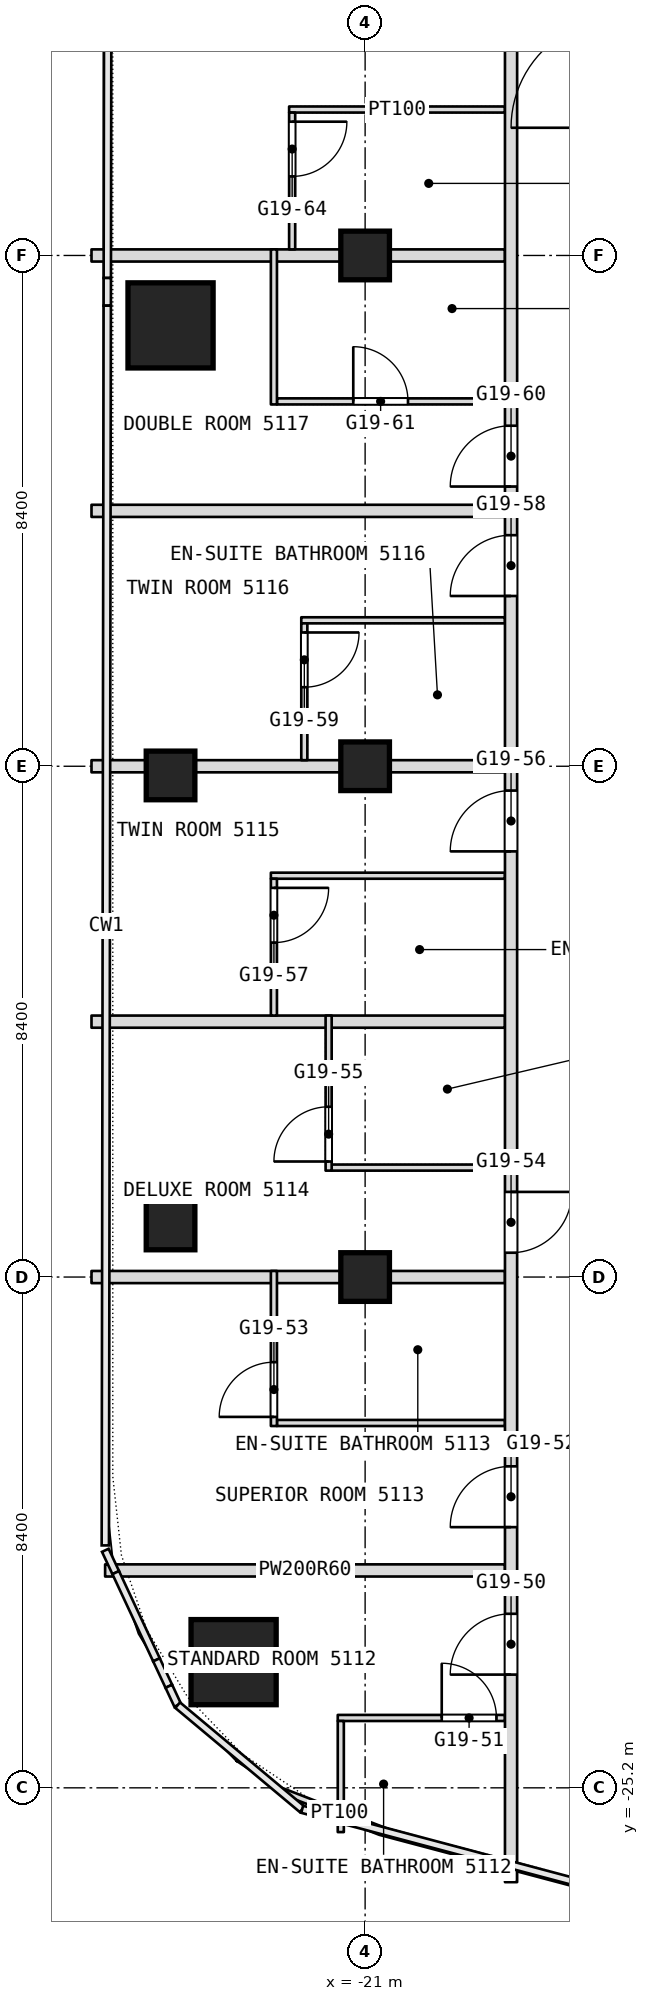
"""IFC4 building model, lengths in metres.
Left out: names, types, materials, properties, quantities, classifications, styles, units other than length and angle.
Written with IfcOpenShell. Run it as: python <this file> out.ifc"""

import sys

from ifc_helpers import new_model, si_unit, direction, frame, frame_2d, origin, origin_2d, place, context, subcontext, project, spatial, rectangle, extrude, element, fill, save


model = new_model("IFC4")
c1 = context("Model", 3, precision=1e-05, world=origin(), true_north=direction((0.0, 1.0)))
c2 = subcontext(c1, "Body", "Model", "MODEL_VIEW")
j1 = project(units=[si_unit("LENGTHUNIT", "METRE"), si_unit("PLANEANGLEUNIT", "RADIAN")], contexts=[c1])
p1 = place(None, origin())
s1 = spatial("IfcSite", under=j1, at=p1, CompositionType="ELEMENT")
p2 = place(p1, origin())
s2 = spatial("IfcBuilding", under=s1, at=p2, CompositionType="ELEMENT")
p3 = place(p2, frame((0.0, 0.0, 220.1)))
s3 = spatial("IfcBuildingStorey", under=s2, at=p3, CompositionType="ELEMENT", Elevation=220.1)
for number, where, z_axis, x_axis in (
    (1, (-23.163, -23.133, 0.0), (0.0, 0.0, 1.0), (1.0, 0.0, 0.0)),
    (2, (-24.2, -1.15, 0.0), (0.0, 0.0, 1.0), (1.0, 0.0, 0.0)),
):
    element("IfcColumn", number, at=place(p3, frame(where, z_axis=z_axis, x_axis=x_axis)), inside=s3, PredefinedType="COLUMN", context=c2, shape_type="SweptSolid", body=[
        extrude(rectangle(XDim=1.4, YDim=1.4, at=origin_2d()), origin(), (0.0, 0.0, 1.0), 3.6),
    ])
for number, where, z_axis, x_axis in (
    (3, (-21.0, -16.8, 0.0), (0.0, 0.0, 1.0), (1.0, 0.0, 0.0)),
    (4, (-21.0, -8.4, 0.0), (0.0, 0.0, 1.0), (1.0, 0.0, 0.0)),
    (5, (-21.0, 0.0, 0.0), (0.0, 0.0, 1.0), (1.0, 0.0, 0.0)),
    (6, (-24.2, -15.952, 0.0), (0.0, 0.0, 1.0), (1.0, 0.0, 0.0)),
    (7, (-24.2, -8.551, 0.0), (0.0, 0.0, 1.0), (1.0, 0.0, 0.0)),
):
    element("IfcColumn", number, at=place(p3, frame(where, z_axis=z_axis, x_axis=x_axis)), inside=s3, PredefinedType="COLUMN", context=c2, shape_type="SweptSolid", body=[
        extrude(rectangle(XDim=0.8, YDim=0.8, at=origin_2d()), origin(), (0.0, 0.0, 1.0), 3.6),
    ])
p4 = place(p3, frame((-22.386, -25.247, 0.0), z_axis=(0.0, 0.0, 1.0), x_axis=(0.932741240306, -0.360546499959, 0.0)))
e8 = element("IfcWall", 8, at=p4, inside=s3, PredefinedType="PARTITIONING", context=c2, shape_type="SweptSolid", body=[
    extrude(rectangle(XDim=2.066, YDim=0.1, at=frame_2d((1.033, 0.0))), origin(), (0.0, 0.0, 1.0), 3.34),
])
p5 = place(p3, frame((-21.45, -24.051, 0.0), z_axis=(0.0, 0.0, 1.0), x_axis=(1.0, 0.0, 0.0)))
e9 = element("IfcWall", 9, at=p5, inside=s3, PredefinedType="PARTITIONING", context=c2, shape_type="SweptSolid", body=[
    extrude(rectangle(XDim=2.75, YDim=0.1, at=frame_2d((1.375, 0.0))), origin(), (0.0, 0.0, 1.0), 3.34),
])
p6 = place(p5, frame((1.71, 0.0, 0.0)))
e10 = element("IfcOpeningElement", 10, at=p6, cuts=e9, PredefinedType="OPENING", context=c2, shape_type="SweptSolid", body=[
    extrude(rectangle(XDim=0.9, YDim=2.1, at=frame_2d((0.45, 1.05))), frame((0.0, 0.05, 0.0), z_axis=(0.0, -1.0, 0.0), x_axis=(1.0, 0.0, 0.0)), (0.0, 0.0, 1.0), 0.1),
])
p7 = place(p3, frame((-25.276, -21.625, 0.0), z_axis=(0.0, 0.0, 1.0), x_axis=(1.0, 0.0, 0.0)))
e11 = element("IfcWall", 11, at=p7, inside=s3, PredefinedType="PARTITIONING", context=c2, shape_type="SweptSolid", body=[
    extrude(rectangle(XDim=6.576, YDim=0.2, at=frame_2d((3.288, 0.0))), origin(), (0.0, 0.0, 1.0), 3.34),
])
p8 = place(p3, frame((-22.45, -19.2, 0.0), z_axis=(0.0, 0.0, 1.0), x_axis=(1.0, 0.0, 0.0)))
e12 = element("IfcWall", 12, at=p8, inside=s3, PredefinedType="PARTITIONING", context=c2, shape_type="SweptSolid", body=[
    extrude(rectangle(XDim=3.75, YDim=0.1, at=frame_2d((1.875, 0.0))), origin(), (0.0, 0.0, 1.0), 3.34),
])
p9 = place(p3, frame((-25.5, -16.8, 0.0), z_axis=(0.0, 0.0, 1.0), x_axis=(1.0, 0.0, 0.0)))
e13 = element("IfcWall", 13, at=p9, inside=s3, PredefinedType="PARTITIONING", context=c2, shape_type="SweptSolid", body=[
    extrude(rectangle(XDim=6.8, YDim=0.2, at=frame_2d((3.4, 0.0))), origin(), (0.0, 0.0, 1.0), 2.94),
])
p10 = place(p3, frame((-21.55, -15.0, 0.0), z_axis=(0.0, 0.0, 1.0), x_axis=(1.0, 0.0, 0.0)))
e14 = element("IfcWall", 14, at=p10, inside=s3, PredefinedType="PARTITIONING", context=c2, shape_type="SweptSolid", body=[
    extrude(rectangle(XDim=2.85, YDim=0.1, at=frame_2d((1.425, 0.0))), origin(), (0.0, 0.0, 1.0), 3.34),
])
p11 = place(p3, frame((-25.5, -12.6, 0.0), z_axis=(0.0, 0.0, 1.0), x_axis=(1.0, 0.0, 0.0)))
e15 = element("IfcWall", 15, at=p11, inside=s3, PredefinedType="PARTITIONING", context=c2, shape_type="SweptSolid", body=[
    extrude(rectangle(XDim=6.8, YDim=0.2, at=frame_2d((3.4, 0.0))), origin(), (0.0, 0.0, 1.0), 3.34),
])
p12 = place(p3, frame((-22.55, -10.2, 0.0), z_axis=(0.0, 0.0, 1.0), x_axis=(1.0, 0.0, 0.0)))
e16 = element("IfcWall", 16, at=p12, inside=s3, PredefinedType="PARTITIONING", context=c2, shape_type="SweptSolid", body=[
    extrude(rectangle(XDim=3.85, YDim=0.1, at=frame_2d((1.925, 0.0))), origin(), (0.0, 0.0, 1.0), 3.34),
])
p13 = place(p3, frame((-25.5, -8.4, 0.0), z_axis=(0.0, 0.0, 1.0), x_axis=(1.0, 0.0, 0.0)))
e17 = element("IfcWall", 17, at=p13, inside=s3, PredefinedType="PARTITIONING", context=c2, shape_type="SweptSolid", body=[
    extrude(rectangle(XDim=6.8, YDim=0.2, at=frame_2d((3.4, 0.0))), origin(), (0.0, 0.0, 1.0), 2.94),
])
p14 = place(p3, frame((-22.05, -6.0, 0.0), z_axis=(0.0, 0.0, 1.0), x_axis=(1.0, 0.0, 0.0)))
e18 = element("IfcWall", 18, at=p14, inside=s3, PredefinedType="PARTITIONING", context=c2, shape_type="SweptSolid", body=[
    extrude(rectangle(XDim=3.35, YDim=0.1, at=frame_2d((1.675, 0.0))), origin(), (0.0, 0.0, 1.0), 3.34),
])
p15 = place(p3, frame((-25.5, -4.2, 0.0), z_axis=(0.0, 0.0, 1.0), x_axis=(1.0, 0.0, 0.0)))
e19 = element("IfcWall", 19, at=p15, inside=s3, PredefinedType="PARTITIONING", context=c2, shape_type="SweptSolid", body=[
    extrude(rectangle(XDim=6.8, YDim=0.2, at=frame_2d((3.4, 0.0))), origin(), (0.0, 0.0, 1.0), 3.34),
])
p16 = place(p3, frame((-22.45, -2.4, 0.0), z_axis=(0.0, 0.0, 1.0), x_axis=(1.0, 0.0, 0.0)))
e20 = element("IfcWall", 20, at=p16, inside=s3, PredefinedType="PARTITIONING", context=c2, shape_type="SweptSolid", body=[
    extrude(rectangle(XDim=3.75, YDim=0.1, at=frame_2d((1.875, 0.0))), origin(), (0.0, 0.0, 1.0), 3.34),
])
p17 = place(p16, frame((1.255, 0.0, 0.0)))
e21 = element("IfcOpeningElement", 21, at=p17, cuts=e20, PredefinedType="OPENING", context=c2, shape_type="SweptSolid", body=[
    extrude(rectangle(XDim=0.9, YDim=2.1, at=frame_2d((0.45, 1.05))), frame((0.0, 0.05, 0.0), z_axis=(0.0, -1.0, 0.0), x_axis=(1.0, 0.0, 0.0)), (0.0, 0.0, 1.0), 0.1),
])
p18 = place(p3, frame((-25.5, 0.0, 0.0), z_axis=(0.0, 0.0, 1.0), x_axis=(1.0, 0.0, 0.0)))
e22 = element("IfcWall", 22, at=p18, inside=s3, PredefinedType="PARTITIONING", context=c2, shape_type="SweptSolid", body=[
    extrude(rectangle(XDim=6.8, YDim=0.2, at=frame_2d((3.4, 0.0))), origin(), (0.0, 0.0, 1.0), 2.94),
])
p19 = place(p3, frame((-22.25, 2.4, 0.0), z_axis=(0.0, 0.0, 1.0), x_axis=(1.0, 0.0, 0.0)))
e23 = element("IfcWall", 23, at=p19, inside=s3, PredefinedType="PARTITIONING", context=c2, shape_type="SweptSolid", body=[
    extrude(rectangle(XDim=3.55, YDim=0.1, at=frame_2d((1.775, 0.0))), origin(), (0.0, 0.0, 1.0), 3.34),
])
p20 = place(p3, frame((-18.6, -26.751, 0.0), z_axis=(0.0, 0.0, 1.0), x_axis=(0.0, 1.0, 0.0)))
e24 = element("IfcWall", 24, at=p20, inside=s3, PredefinedType="PARTITIONING", context=c2, shape_type="SweptSolid", body=[
    extrude(rectangle(XDim=49.091, YDim=0.2, at=frame_2d((24.545, 0.0))), origin(), (0.0, 0.0, 1.0), 3.34),
])
p21 = place(p20, frame((3.413, 0.0, 0.0)))
e25 = element("IfcOpeningElement", 25, at=p21, cuts=e24, PredefinedType="OPENING", context=c2, shape_type="SweptSolid", body=[
    extrude(rectangle(XDim=1.0, YDim=2.1, at=frame_2d((0.5, 1.05))), frame((0.0, 0.1, 0.0), z_axis=(0.0, -1.0, 0.0), x_axis=(1.0, 0.0, 0.0)), (0.0, 0.0, 1.0), 0.2),
])
p22 = place(p20, frame((5.838, 0.0, 0.0)))
e26 = element("IfcOpeningElement", 26, at=p22, cuts=e24, PredefinedType="OPENING", context=c2, shape_type="SweptSolid", body=[
    extrude(rectangle(XDim=1.0, YDim=2.1, at=frame_2d((0.5, 1.05))), frame((0.0, 0.1, 0.0), z_axis=(0.0, -1.0, 0.0), x_axis=(1.0, 0.0, 0.0)), (0.0, 0.0, 1.0), 0.2),
])
p23 = place(p20, frame((10.351, 0.0, 0.0)))
e27 = element("IfcOpeningElement", 27, at=p23, cuts=e24, PredefinedType="OPENING", context=c2, shape_type="SweptSolid", body=[
    extrude(rectangle(XDim=1.0, YDim=2.1, at=frame_2d((0.5, 1.05))), frame((0.0, 0.1, 0.0), z_axis=(0.0, -1.0, 0.0), x_axis=(1.0, 0.0, 0.0)), (0.0, 0.0, 1.0), 0.2),
])
p24 = place(p20, frame((16.951, 0.0, 0.0)))
e28 = element("IfcOpeningElement", 28, at=p24, cuts=e24, PredefinedType="OPENING", context=c2, shape_type="SweptSolid", body=[
    extrude(rectangle(XDim=1.0, YDim=2.1, at=frame_2d((0.5, 1.05))), frame((0.0, 0.1, 0.0), z_axis=(0.0, -1.0, 0.0), x_axis=(1.0, 0.0, 0.0)), (0.0, 0.0, 1.0), 0.2),
])
p25 = place(p20, frame((21.151, 0.0, 0.0)))
e29 = element("IfcOpeningElement", 29, at=p25, cuts=e24, PredefinedType="OPENING", context=c2, shape_type="SweptSolid", body=[
    extrude(rectangle(XDim=1.0, YDim=2.1, at=frame_2d((0.5, 1.05))), frame((0.0, 0.1, 0.0), z_axis=(0.0, -1.0, 0.0), x_axis=(1.0, 0.0, 0.0)), (0.0, 0.0, 1.0), 0.2),
])
p26 = place(p20, frame((22.951, 0.0, 0.0)))
e30 = element("IfcOpeningElement", 30, at=p26, cuts=e24, PredefinedType="OPENING", context=c2, shape_type="SweptSolid", body=[
    extrude(rectangle(XDim=1.0, YDim=2.1, at=frame_2d((0.5, 1.05))), frame((0.0, 0.1, 0.0), z_axis=(0.0, -1.0, 0.0), x_axis=(1.0, 0.0, 0.0)), (0.0, 0.0, 1.0), 0.2),
])
p27 = place(p20, frame((30.351, 0.0, 0.0)))
e31 = element("IfcOpeningElement", 31, at=p27, cuts=e24, PredefinedType="OPENING", context=c2, shape_type="SweptSolid", body=[
    extrude(rectangle(XDim=1.1, YDim=2.1, at=frame_2d((0.55, 1.05))), frame((0.0, 0.1, 0.0), z_axis=(0.0, -1.0, 0.0), x_axis=(1.0, 0.0, 0.0)), (0.0, 0.0, 1.0), 0.2),
])
p28 = place(p20, frame((37.951, 0.0, 0.0)))
e32 = element("IfcOpeningElement", 32, at=p28, cuts=e24, PredefinedType="OPENING", context=c2, shape_type="SweptSolid", body=[
    extrude(rectangle(XDim=1.0, YDim=2.1, at=frame_2d((0.5, 1.05))), frame((0.0, 0.1, 0.0), z_axis=(0.0, -1.0, 0.0), x_axis=(1.0, 0.0, 0.0)), (0.0, 0.0, 1.0), 0.2),
])
p29 = place(p20, frame((39.751, 0.0, 0.0)))
e33 = element("IfcOpeningElement", 33, at=p29, cuts=e24, PredefinedType="OPENING", context=c2, shape_type="SweptSolid", body=[
    extrude(rectangle(XDim=1.0, YDim=2.1, at=frame_2d((0.5, 1.05))), frame((0.0, 0.1, 0.0), z_axis=(0.0, -1.0, 0.0), x_axis=(1.0, 0.0, 0.0)), (0.0, 0.0, 1.0), 0.2),
])
p30 = place(p20, frame((44.051, 0.0, 0.0)))
e34 = element("IfcOpeningElement", 34, at=p30, cuts=e24, PredefinedType="OPENING", context=c2, shape_type="SweptSolid", body=[
    extrude(rectangle(XDim=1.0, YDim=2.1, at=frame_2d((0.5, 1.05))), frame((0.0, 0.1, 0.0), z_axis=(0.0, -1.0, 0.0), x_axis=(1.0, 0.0, 0.0)), (0.0, 0.0, 1.0), 0.2),
])
p31 = place(p3, frame((-21.4, -25.928, 0.0), z_axis=(0.0, 0.0, 1.0), x_axis=(0.0, 1.0, 0.0)))
e35 = element("IfcWall", 35, at=p31, inside=s3, PredefinedType="PARTITIONING", context=c2, shape_type="SweptSolid", body=[
    extrude(rectangle(XDim=1.827, YDim=0.1, at=frame_2d((0.914, 0.0))), origin(), (0.0, 0.0, 1.0), 3.34),
])
p32 = place(p3, frame((-21.6, -15.05, 0.0), z_axis=(0.0, 0.0, 1.0), x_axis=(0.0, 1.0, 0.0)))
e36 = element("IfcWall", 36, at=p32, inside=s3, PredefinedType="PARTITIONING", context=c2, shape_type="SweptSolid", body=[
    extrude(rectangle(XDim=2.55, YDim=0.1, at=frame_2d((1.275, 0.0))), origin(), (0.0, 0.0, 1.0), 3.34),
])
p33 = place(p32, frame((0.15, 0.0, 0.0)))
e37 = element("IfcOpeningElement", 37, at=p33, cuts=e36, PredefinedType="OPENING", context=c2, shape_type="SweptSolid", body=[
    extrude(rectangle(XDim=0.9, YDim=2.1, at=frame_2d((0.45, 1.05))), frame((0.0, 0.05, 0.0), z_axis=(0.0, -1.0, 0.0), x_axis=(1.0, 0.0, 0.0)), (0.0, 0.0, 1.0), 0.1),
])
p34 = place(p3, frame((-22.0, -8.3, 0.0), z_axis=(0.0, 0.0, 1.0), x_axis=(0.0, 1.0, 0.0)))
e38 = element("IfcWall", 38, at=p34, inside=s3, PredefinedType="PARTITIONING", context=c2, shape_type="SweptSolid", body=[
    extrude(rectangle(XDim=2.25, YDim=0.1, at=frame_2d((1.125, 0.0))), origin(), (0.0, 0.0, 1.0), 3.34),
])
p35 = place(p34, frame((1.2, 0.0, 0.0)))
e39 = element("IfcOpeningElement", 39, at=p35, cuts=e38, PredefinedType="OPENING", context=c2, shape_type="SweptSolid", body=[
    extrude(rectangle(XDim=0.9, YDim=2.1, at=frame_2d((0.45, 1.05))), frame((0.0, 0.05, 0.0), z_axis=(0.0, -1.0, 0.0), x_axis=(1.0, 0.0, 0.0)), (0.0, 0.0, 1.0), 0.1),
])
p36 = place(p3, frame((-22.2, 0.1, 0.0), z_axis=(0.0, 0.0, 1.0), x_axis=(0.0, 1.0, 0.0)))
e40 = element("IfcWall", 40, at=p36, inside=s3, PredefinedType="PARTITIONING", context=c2, shape_type="SweptSolid", body=[
    extrude(rectangle(XDim=2.25, YDim=0.1, at=frame_2d((1.125, 0.0))), origin(), (0.0, 0.0, 1.0), 3.34),
])
p37 = place(p36, frame((1.2, 0.0, 0.0)))
e41 = element("IfcOpeningElement", 41, at=p37, cuts=e40, PredefinedType="OPENING", context=c2, shape_type="SweptSolid", body=[
    extrude(rectangle(XDim=0.9, YDim=2.1, at=frame_2d((0.45, 1.05))), frame((0.0, 0.05, 0.0), z_axis=(0.0, -1.0, 0.0), x_axis=(1.0, 0.0, 0.0)), (0.0, 0.0, 1.0), 0.1),
])
p38 = place(p3, frame((-22.5, -19.25, 0.0), z_axis=(0.0, 0.0, 1.0), x_axis=(0.0, 1.0, 0.0)))
e42 = element("IfcWall", 42, at=p38, inside=s3, PredefinedType="PARTITIONING", context=c2, shape_type="SweptSolid", body=[
    extrude(rectangle(XDim=2.55, YDim=0.1, at=frame_2d((1.275, 0.0))), origin(), (0.0, 0.0, 1.0), 3.34),
])
p39 = place(p38, frame((0.15, 0.0, 0.0)))
e43 = element("IfcOpeningElement", 43, at=p39, cuts=e42, PredefinedType="OPENING", context=c2, shape_type="SweptSolid", body=[
    extrude(rectangle(XDim=0.9, YDim=2.1, at=frame_2d((0.45, 1.05))), frame((0.0, 0.05, 0.0), z_axis=(0.0, -1.0, 0.0), x_axis=(1.0, 0.0, 0.0)), (0.0, 0.0, 1.0), 0.1),
])
p40 = place(p3, frame((-22.5, -12.5, 0.0), z_axis=(0.0, 0.0, 1.0), x_axis=(0.0, 1.0, 0.0)))
e44 = element("IfcWall", 44, at=p40, inside=s3, PredefinedType="PARTITIONING", context=c2, shape_type="SweptSolid", body=[
    extrude(rectangle(XDim=2.25, YDim=0.1, at=frame_2d((1.125, 0.0))), origin(), (0.0, 0.0, 1.0), 3.34),
])
p41 = place(p40, frame((1.2, 0.0, 0.0)))
e45 = element("IfcOpeningElement", 45, at=p41, cuts=e44, PredefinedType="OPENING", context=c2, shape_type="SweptSolid", body=[
    extrude(rectangle(XDim=0.9, YDim=2.1, at=frame_2d((0.45, 1.05))), frame((0.0, 0.05, 0.0), z_axis=(0.0, -1.0, 0.0), x_axis=(1.0, 0.0, 0.0)), (0.0, 0.0, 1.0), 0.1),
])
p42 = place(p3, frame((-22.5, -2.45, 0.0), z_axis=(0.0, 0.0, 1.0), x_axis=(0.0, 1.0, 0.0)))
e46 = element("IfcWall", 46, at=p42, inside=s3, PredefinedType="PARTITIONING", context=c2, shape_type="SweptSolid", body=[
    extrude(rectangle(XDim=2.55, YDim=0.1, at=frame_2d((1.275, 0.0))), origin(), (0.0, 0.0, 1.0), 3.34),
])
p43 = place(p6, origin())
e47 = element("IfcDoor", 47, at=p43, inside=s3, OperationType="SINGLE_SWING_LEFT", PredefinedType="DOOR", context=c2, shape_type="SweptSolid", body=[
    extrude(rectangle(XDim=0.9, YDim=2.1, at=frame_2d((0.45, 1.05))), frame((0.0, 0.025, 0.0), z_axis=(0.0, -1.0, 0.0), x_axis=(1.0, 0.0, 0.0)), (0.0, 0.0, 1.0), 0.05),
])
fill(e10, e47)
p44 = place(p17, origin())
e48 = element("IfcDoor", 48, at=p44, inside=s3, OperationType="SINGLE_SWING_LEFT", PredefinedType="DOOR", context=c2, shape_type="SweptSolid", body=[
    extrude(rectangle(XDim=0.9, YDim=2.1, at=frame_2d((0.45, 1.05))), frame((0.0, 0.025, 0.0), z_axis=(0.0, -1.0, 0.0), x_axis=(1.0, 0.0, 0.0)), (0.0, 0.0, 1.0), 0.05),
])
fill(e21, e48)
p45 = place(p21, origin())
e49 = element("IfcDoor", 49, at=p45, inside=s3, OperationType="SINGLE_SWING_LEFT", PredefinedType="DOOR", context=c2, shape_type="SweptSolid", body=[
    extrude(rectangle(XDim=1.0, YDim=2.1, at=frame_2d((0.5, 1.05))), frame((0.0, 0.025, 0.0), z_axis=(0.0, -1.0, 0.0), x_axis=(1.0, 0.0, 0.0)), (0.0, 0.0, 1.0), 0.05),
])
fill(e25, e49)
p46 = place(p22, origin())
e50 = element("IfcDoor", 50, at=p46, inside=s3, OperationType="SINGLE_SWING_LEFT", PredefinedType="DOOR", context=c2, shape_type="SweptSolid", body=[
    extrude(rectangle(XDim=1.0, YDim=2.1, at=frame_2d((0.5, 1.05))), frame((0.0, 0.025, 0.0), z_axis=(0.0, -1.0, 0.0), x_axis=(1.0, 0.0, 0.0)), (0.0, 0.0, 1.0), 0.05),
])
fill(e26, e50)
p47 = place(p23, origin())
e51 = element("IfcDoor", 51, at=p47, inside=s3, OperationType="SINGLE_SWING_LEFT", PredefinedType="DOOR", context=c2, shape_type="SweptSolid", body=[
    extrude(rectangle(XDim=1.0, YDim=2.1, at=frame_2d((0.5, 1.05))), frame((0.0, 0.025, 0.0), z_axis=(0.0, -1.0, 0.0), x_axis=(1.0, 0.0, 0.0)), (0.0, 0.0, 1.0), 0.05),
])
fill(e27, e51)
p48 = place(p24, origin())
e52 = element("IfcDoor", 52, at=p48, inside=s3, OperationType="SINGLE_SWING_LEFT", PredefinedType="DOOR", context=c2, shape_type="SweptSolid", body=[
    extrude(rectangle(XDim=1.0, YDim=2.1, at=frame_2d((0.5, 1.05))), frame((0.0, 0.025, 0.0), z_axis=(0.0, -1.0, 0.0), x_axis=(1.0, 0.0, 0.0)), (0.0, 0.0, 1.0), 0.05),
])
fill(e28, e52)
p49 = place(p25, origin())
e53 = element("IfcDoor", 53, at=p49, inside=s3, OperationType="SINGLE_SWING_LEFT", PredefinedType="DOOR", context=c2, shape_type="SweptSolid", body=[
    extrude(rectangle(XDim=1.0, YDim=2.1, at=frame_2d((0.5, 1.05))), frame((0.0, 0.025, 0.0), z_axis=(0.0, -1.0, 0.0), x_axis=(1.0, 0.0, 0.0)), (0.0, 0.0, 1.0), 0.05),
])
fill(e29, e53)
p50 = place(p26, origin())
e54 = element("IfcDoor", 54, at=p50, inside=s3, OperationType="SINGLE_SWING_LEFT", PredefinedType="DOOR", context=c2, shape_type="SweptSolid", body=[
    extrude(rectangle(XDim=1.0, YDim=2.1, at=frame_2d((0.5, 1.05))), frame((0.0, 0.025, 0.0), z_axis=(0.0, -1.0, 0.0), x_axis=(1.0, 0.0, 0.0)), (0.0, 0.0, 1.0), 0.05),
])
fill(e30, e54)
p51 = place(p33, origin())
e55 = element("IfcDoor", 55, at=p51, inside=s3, OperationType="SINGLE_SWING_RIGHT", PredefinedType="DOOR", context=c2, shape_type="SweptSolid", body=[
    extrude(rectangle(XDim=0.9, YDim=2.1, at=frame_2d((0.45, 1.05))), frame((0.0, 0.025, 0.0), z_axis=(0.0, -1.0, 0.0), x_axis=(1.0, 0.0, 0.0)), (0.0, 0.0, 1.0), 0.05),
])
fill(e37, e55)
p52 = place(p35, origin())
e56 = element("IfcDoor", 56, at=p52, inside=s3, OperationType="SINGLE_SWING_LEFT", PredefinedType="DOOR", context=c2, shape_type="SweptSolid", body=[
    extrude(rectangle(XDim=0.9, YDim=2.1, at=frame_2d((0.45, 1.05))), frame((0.0, 0.025, 0.0), z_axis=(0.0, -1.0, 0.0), x_axis=(1.0, 0.0, 0.0)), (0.0, 0.0, 1.0), 0.05),
])
fill(e39, e56)
p53 = place(p37, origin())
e57 = element("IfcDoor", 57, at=p53, inside=s3, OperationType="SINGLE_SWING_LEFT", PredefinedType="DOOR", context=c2, shape_type="SweptSolid", body=[
    extrude(rectangle(XDim=0.9, YDim=2.1, at=frame_2d((0.45, 1.05))), frame((0.0, 0.025, 0.0), z_axis=(0.0, -1.0, 0.0), x_axis=(1.0, 0.0, 0.0)), (0.0, 0.0, 1.0), 0.05),
])
fill(e41, e57)
p54 = place(p39, origin())
e58 = element("IfcDoor", 58, at=p54, inside=s3, OperationType="SINGLE_SWING_RIGHT", PredefinedType="DOOR", context=c2, shape_type="SweptSolid", body=[
    extrude(rectangle(XDim=0.9, YDim=2.1, at=frame_2d((0.45, 1.05))), frame((0.0, 0.025, 0.0), z_axis=(0.0, -1.0, 0.0), x_axis=(1.0, 0.0, 0.0)), (0.0, 0.0, 1.0), 0.05),
])
fill(e43, e58)
p55 = place(p41, origin())
e59 = element("IfcDoor", 59, at=p55, inside=s3, OperationType="SINGLE_SWING_LEFT", PredefinedType="DOOR", context=c2, shape_type="SweptSolid", body=[
    extrude(rectangle(XDim=0.9, YDim=2.1, at=frame_2d((0.45, 1.05))), frame((0.0, 0.025, 0.0), z_axis=(0.0, -1.0, 0.0), x_axis=(1.0, 0.0, 0.0)), (0.0, 0.0, 1.0), 0.05),
])
fill(e45, e59)
save(model, sys.argv[1])
